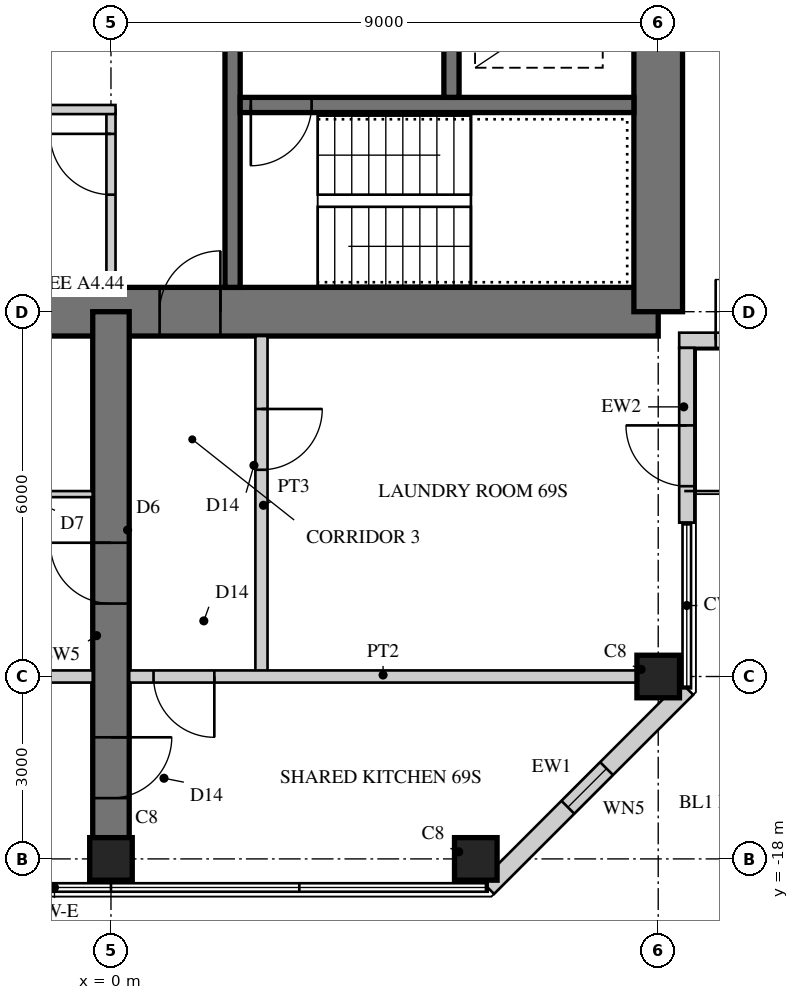
"""IFC4 building model, lengths in metres.
Left out: names, types, materials, properties, quantities, classifications, styles, units other than length and angle.
Written with IfcOpenShell. Run it as: python <this file> out.ifc"""

import sys

from ifc_helpers import new_model, si_unit, direction, frame, frame_2d, origin, origin_2d, place, context, subcontext, project, spatial, rectangle, hollow_rectangle, extrude, element, fill, save


model = new_model("IFC4")
c1 = context("Model", 3, precision=1e-05, world=origin(), true_north=direction((0.0, 1.0)))
c2 = subcontext(c1, "Body", "Model", "MODEL_VIEW")
j1 = project(units=[si_unit("LENGTHUNIT", "METRE"), si_unit("PLANEANGLEUNIT", "RADIAN")], contexts=[c1])
p1 = place(None, origin())
s1 = spatial("IfcSite", under=j1, at=p1, CompositionType="ELEMENT")
p2 = place(p1, origin())
s2 = spatial("IfcBuilding", under=s1, at=p2, CompositionType="ELEMENT")
p3 = place(p2, frame((0.0, 0.0, 267.9)))
s3 = spatial("IfcBuildingStorey", under=s2, at=p3, CompositionType="ELEMENT", Elevation=267.9)
p4 = place(p3, frame((-9.0, -9.0, 0.0), z_axis=(0.0, 0.0, 1.0), x_axis=(1.0, 0.0, 0.0)))
e1 = element("IfcWall", 1, at=p4, inside=s3, PredefinedType="SHEAR", context=c2, shape_type="SweptSolid", body=[
    extrude(rectangle(XDim=18.0, YDim=0.8, at=frame_2d((9.0, 0.0))), origin(), (0.0, 0.0, 1.0), 3.4),
])
p5 = place(p4, frame((9.8, 0.0, 0.0)))
e2 = element("IfcOpeningElement", 2, at=p5, cuts=e1, PredefinedType="OPENING", context=c2, shape_type="SweptSolid", body=[
    extrude(rectangle(XDim=1.0, YDim=2.4, at=frame_2d((0.5, 1.2))), frame((0.0, 0.41, 0.0), z_axis=(0.0, -1.0, 0.0), x_axis=(1.0, 0.0, 0.0)), (0.0, 0.0, 1.0), 0.82),
])
p6 = place(p3, frame((9.0, -9.0, 0.0), z_axis=(0.0, 0.0, 1.0), x_axis=(0.0, 1.0, 0.0)))
e3 = element("IfcWall", 3, at=p6, inside=s3, PredefinedType="SHEAR", context=c2, shape_type="SweptSolid", body=[
    extrude(rectangle(XDim=18.0, YDim=0.8, at=frame_2d((9.0, 0.0))), origin(), (0.0, 0.0, 1.0), 3.4),
])
p7 = place(p6, frame((9.8, 0.0, 0.0)))
e4 = element("IfcOpeningElement", 4, at=p7, cuts=e3, PredefinedType="OPENING", context=c2, shape_type="SweptSolid", body=[
    extrude(rectangle(XDim=1.0, YDim=2.4, at=frame_2d((0.5, 1.2))), frame((0.0, 0.41, 0.0), z_axis=(0.0, -1.0, 0.0), x_axis=(1.0, 0.0, 0.0)), (0.0, 0.0, 1.0), 0.82),
])
p8 = place(p3, frame((2.0, -1.675, 0.0), z_axis=(0.0, 0.0, 1.0), x_axis=(0.0, -1.0, 0.0)))
e5 = element("IfcWall", 5, at=p8, inside=s3, PredefinedType="SHEAR", context=c2, shape_type="SweptSolid", body=[
    extrude(rectangle(XDim=6.925, YDim=0.25, at=frame_2d((3.462, 0.0))), origin(), (0.0, 0.0, 1.0), 3.4),
])
p9 = place(p8, frame((0.725, 0.0, 0.0)))
e6 = element("IfcOpeningElement", 6, at=p9, cuts=e5, PredefinedType="OPENING", context=c2, shape_type="SweptSolid", body=[
    extrude(rectangle(XDim=1.0, YDim=2.1, at=frame_2d((0.5, 1.05))), frame((0.0, 0.135, 0.0), z_axis=(0.0, -1.0, 0.0), x_axis=(1.0, 0.0, 0.0)), (0.0, 0.0, 1.0), 0.27),
])
p10 = place(p3, frame((2.125, -5.6, 0.0), z_axis=(0.0, 0.0, 1.0), x_axis=(1.0, 0.0, 0.0)))
e7 = element("IfcWall", 7, at=p10, inside=s3, PredefinedType="SHEAR", context=c2, shape_type="SweptSolid", body=[
    extrude(rectangle(XDim=6.475, YDim=0.25, at=frame_2d((3.238, 0.0))), origin(), (0.0, 0.0, 1.0), 3.4),
])
p11 = place(p10, frame((0.175, 0.0, 0.0)))
e8 = element("IfcOpeningElement", 8, at=p11, cuts=e7, PredefinedType="OPENING", context=c2, shape_type="SweptSolid", body=[
    extrude(rectangle(XDim=1.0, YDim=2.1, at=frame_2d((0.5, 1.05))), frame((0.0, 0.135, 0.0), z_axis=(0.0, -1.0, 0.0), x_axis=(1.0, 0.0, 0.0)), (0.0, 0.0, 1.0), 0.27),
])
p12 = place(p3, frame((5.6, -1.925, 0.0), z_axis=(0.0, 0.0, 1.0), x_axis=(0.0, -1.0, 0.0)))
e9 = element("IfcWall", 9, at=p12, inside=s3, PredefinedType="SHEAR", context=c2, shape_type="SweptSolid", body=[
    extrude(rectangle(XDim=3.55, YDim=0.25, at=frame_2d((1.775, 0.0))), origin(), (0.0, 0.0, 1.0), 3.4),
])
p13 = place(p12, frame((1.525, 0.0, 0.0)))
e10 = element("IfcOpeningElement", 10, at=p13, cuts=e9, PredefinedType="OPENING", context=c2, shape_type="SweptSolid", body=[
    extrude(rectangle(XDim=1.1, YDim=2.2, at=frame_2d((0.55, 1.1))), frame((0.0, 0.135, 0.0), z_axis=(0.0, -1.0, 0.0), x_axis=(1.0, 0.0, 0.0)), (0.0, 0.0, 1.0), 0.27),
])
p14 = place(p12, frame((0.075, 0.0, 0.0)))
e11 = element("IfcOpeningElement", 11, at=p14, cuts=e9, PredefinedType="OPENING", context=c2, shape_type="SweptSolid", body=[
    extrude(rectangle(XDim=0.8, YDim=2.1, at=frame_2d((0.4, 1.05))), frame((0.0, 0.135, 0.0), z_axis=(0.0, -1.0, 0.0), x_axis=(1.0, 0.0, 0.0)), (0.0, 0.0, 1.0), 0.27),
])
p15 = place(p3, frame((0.0, -9.0, 0.0), z_axis=(0.0, 0.0, 1.0), x_axis=(0.0, -1.0, 0.0)))
e12 = element("IfcWall", 12, at=p15, inside=s3, PredefinedType="SHEAR", context=c2, shape_type="SweptSolid", body=[
    extrude(rectangle(XDim=9.0, YDim=0.6, at=frame_2d((4.5, 0.0))), origin(), (0.0, 0.0, 1.0), 3.4),
])
p16 = place(p15, frame((3.8, 0.0, 0.0)))
e13 = element("IfcOpeningElement", 13, at=p16, cuts=e12, PredefinedType="OPENING", context=c2, shape_type="SweptSolid", body=[
    extrude(rectangle(XDim=1.0, YDim=2.15, at=frame_2d((0.5, 1.075))), frame((0.0, 0.31, 0.0), z_axis=(0.0, -1.0, 0.0), x_axis=(1.0, 0.0, 0.0)), (0.0, 0.0, 1.0), 0.62),
])
p17 = place(p15, frame((7.0, 0.0, 0.0)))
e14 = element("IfcOpeningElement", 14, at=p17, cuts=e12, PredefinedType="OPENING", context=c2, shape_type="SweptSolid", body=[
    extrude(rectangle(XDim=1.0, YDim=2.2, at=frame_2d((0.5, 1.1))), frame((0.0, 0.31, 0.0), z_axis=(0.0, -1.0, 0.0), x_axis=(1.0, 0.0, 0.0)), (0.0, 0.0, 1.0), 0.62),
])
for number, where, z_axis, x_axis in (
    (15, (9.0, -15.0, 0.0), (0.0, 0.0, 1.0), (1.0, 0.0, 0.0)),
    (16, (0.0, -18.0, 0.0), (0.0, 0.0, 1.0), (1.0, 0.0, 0.0)),
    (17, (6.0, -18.0, 0.0), (0.0, 0.0, 1.0), (1.0, 0.0, 0.0)),
):
    element("IfcColumn", number, at=place(p3, frame(where, z_axis=z_axis, x_axis=x_axis)), inside=s3, PredefinedType="COLUMN", context=c2, shape_type="SweptSolid", body=[
        extrude(rectangle(XDim=0.7, YDim=0.7, at=origin_2d()), origin(), (0.0, 0.0, 1.0), 3.4),
    ])
p18 = place(p3, frame((9.345, -9.47, 0.0), z_axis=(0.0, 0.0, 1.0), x_axis=(1.0, 0.0, 0.0)))
e18 = element("IfcWall", 18, at=p18, inside=s3, PredefinedType="SOLIDWALL", context=c2, shape_type="SweptSolid", body=[
    extrude(rectangle(XDim=3.125, YDim=0.25, at=frame_2d((1.562, 0.0))), origin(), (0.0, 0.0, 1.0), 3.22),
])
p19 = place(p18, frame((0.6, 0.0, 0.0)))
e19 = element("IfcOpeningElement", 19, at=p19, cuts=e18, PredefinedType="OPENING", context=c2, shape_type="SweptSolid", body=[
    extrude(rectangle(XDim=1.0, YDim=2.2, at=frame_2d((0.5, 1.1))), frame((0.0, 0.135, 0.0), z_axis=(0.0, -1.0, 0.0), x_axis=(1.0, 0.0, 0.0)), (0.0, 0.0, 1.0), 0.27),
])
p20 = place(p3, frame((6.195, -18.47, 0.0), z_axis=(0.0, 0.0, 1.0), x_axis=(0.707106781187, 0.707106781187, 0.0)))
e20 = element("IfcWall", 20, at=p20, inside=s3, PredefinedType="SOLIDWALL", context=c2, shape_type="SweptSolid", body=[
    extrude(rectangle(XDim=4.632, YDim=0.3, at=frame_2d((2.316, 0.0))), origin(), (0.0, 0.0, 1.0), 3.22),
])
p21 = place(p20, frame((1.866, 0.0, 0.3)))
e21 = element("IfcOpeningElement", 21, at=p21, cuts=e20, PredefinedType="OPENING", context=c2, shape_type="SweptSolid", body=[
    extrude(rectangle(XDim=0.9, YDim=2.4, at=frame_2d((0.45, 1.2))), frame((0.0, 0.16, 0.0), z_axis=(0.0, -1.0, 0.0), x_axis=(1.0, 0.0, 0.0)), (0.0, 0.0, 1.0), 0.32),
])
p22 = place(p3, frame((9.47, -12.47, 0.0), z_axis=(0.0, 0.0, 1.0), x_axis=(0.0, 1.0, 0.0)))
e22 = element("IfcWall", 22, at=p22, inside=s3, PredefinedType="SOLIDWALL", context=c2, shape_type="SweptSolid", body=[
    extrude(rectangle(XDim=2.875, YDim=0.25, at=frame_2d((1.438, 0.0))), origin(), (0.0, 0.0, 1.0), 3.22),
])
p23 = place(p22, frame((0.6, 0.0, 0.0)))
e23 = element("IfcOpeningElement", 23, at=p23, cuts=e22, PredefinedType="OPENING", context=c2, shape_type="SweptSolid", body=[
    extrude(rectangle(XDim=1.0, YDim=2.2, at=frame_2d((0.5, 1.1))), frame((0.0, 0.135, 0.0), z_axis=(0.0, -1.0, 0.0), x_axis=(1.0, 0.0, 0.0)), (0.0, 0.0, 1.0), 0.27),
])
p24 = place(p3, frame((0.0, -5.675, 0.0), z_axis=(0.0, 0.0, 1.0), x_axis=(0.0, -1.0, 0.0)))
e24 = element("IfcWall", 24, at=p24, inside=s3, PredefinedType="PARTITIONING", context=c2, shape_type="SweptSolid", body=[
    extrude(rectangle(XDim=2.925, YDim=0.15, at=frame_2d((1.462, 0.0))), origin(), (0.0, 0.0, 1.0), 3.22),
])
p25 = place(p24, frame((0.4, 0.0, 0.0)))
e25 = element("IfcOpeningElement", 25, at=p25, cuts=e24, PredefinedType="OPENING", context=c2, shape_type="SweptSolid", body=[
    extrude(rectangle(XDim=1.0, YDim=2.1, at=frame_2d((0.5, 1.05))), frame((0.0, 0.085, 0.0), z_axis=(0.0, -1.0, 0.0), x_axis=(1.0, 0.0, 0.0)), (0.0, 0.0, 1.0), 0.17),
])
p26 = place(p3, frame((-1.675, -5.675, 0.0), z_axis=(0.0, 0.0, 1.0), x_axis=(1.0, 0.0, 0.0)))
e26 = element("IfcWall", 26, at=p26, inside=s3, PredefinedType="PARTITIONING", context=c2, shape_type="SweptSolid", body=[
    extrude(rectangle(XDim=1.75, YDim=0.15, at=frame_2d((0.875, 0.0))), origin(), (0.0, 0.0, 1.0), 3.22),
])
p27 = place(p3, frame((-2.5, -12.0, 0.0), z_axis=(0.0, 0.0, 1.0), x_axis=(1.0, 0.0, 0.0)))
e27 = element("IfcWall", 27, at=p27, inside=s3, PredefinedType="PARTITIONING", context=c2, shape_type="SweptSolid", body=[
    extrude(rectangle(XDim=2.2, YDim=0.1, at=frame_2d((1.1, 0.0))), origin(), (0.0, 0.0, 1.0), 3.22),
])
p28 = place(p27, frame((0.55, 0.0, 0.0)))
e28 = element("IfcOpeningElement", 28, at=p28, cuts=e27, PredefinedType="OPENING", context=c2, shape_type="SweptSolid", body=[
    extrude(rectangle(XDim=0.9, YDim=2.1, at=frame_2d((0.45, 1.05))), frame((0.0, 0.06, 0.0), z_axis=(0.0, -1.0, 0.0), x_axis=(1.0, 0.0, 0.0)), (0.0, 0.0, 1.0), 0.12),
])
p29 = place(p3, frame((2.475, -9.4, 0.0), z_axis=(0.0, 0.0, 1.0), x_axis=(0.0, -1.0, 0.0)))
e29 = element("IfcWall", 29, at=p29, inside=s3, PredefinedType="SOLIDWALL", context=c2, shape_type="SweptSolid", body=[
    extrude(rectangle(XDim=5.6, YDim=0.2, at=frame_2d((2.8, 0.0))), origin(), (0.0, 0.0, 1.0), 3.22),
])
p30 = place(p29, frame((1.2, 0.0, 0.0)))
e30 = element("IfcOpeningElement", 30, at=p30, cuts=e29, PredefinedType="OPENING", context=c2, shape_type="SweptSolid", body=[
    extrude(rectangle(XDim=1.0, YDim=2.2, at=frame_2d((0.5, 1.1))), frame((0.0, 0.11, 0.0), z_axis=(0.0, -1.0, 0.0), x_axis=(1.0, 0.0, 0.0)), (0.0, 0.0, 1.0), 0.22),
])
p31 = place(p3, frame((-8.65, -15.0, 0.0), z_axis=(0.0, 0.0, 1.0), x_axis=(1.0, 0.0, 0.0)))
e31 = element("IfcWall", 31, at=p31, inside=s3, PredefinedType="SOLIDWALL", context=c2, shape_type="SweptSolid", body=[
    extrude(rectangle(XDim=8.35, YDim=0.2, at=frame_2d((4.175, 0.0))), origin(), (0.0, 0.0, 1.0), 2.52),
])
p32 = place(p3, frame((0.3, -15.0, 0.0), z_axis=(0.0, 0.0, 1.0), x_axis=(1.0, 0.0, 0.0)))
e32 = element("IfcWall", 32, at=p32, inside=s3, PredefinedType="SOLIDWALL", context=c2, shape_type="SweptSolid", body=[
    extrude(rectangle(XDim=8.35, YDim=0.2, at=frame_2d((4.175, 0.0))), origin(), (0.0, 0.0, 1.0), 2.52),
])
p33 = place(p32, frame((0.4, 0.0, 0.0)))
e33 = element("IfcOpeningElement", 33, at=p33, cuts=e32, PredefinedType="OPENING", context=c2, shape_type="SweptSolid", body=[
    extrude(rectangle(XDim=1.0, YDim=2.2, at=frame_2d((0.5, 1.1))), frame((0.0, 0.11, 0.0), z_axis=(0.0, -1.0, 0.0), x_axis=(1.0, 0.0, 0.0)), (0.0, 0.0, 1.0), 0.22),
])
p34 = place(p19, origin())
e34 = element("IfcDoor", 34, at=p34, inside=s3, OperationType="SINGLE_SWING_LEFT", PredefinedType="DOOR", context=c2, shape_type="SweptSolid", body=[
    extrude(hollow_rectangle(XDim=1.0, YDim=2.2, WallThickness=0.06, at=frame_2d((0.5, 1.1))), frame((0.0, 0.025, 0.0), z_axis=(0.0, -1.0, 0.0), x_axis=(1.0, 0.0, 0.0)), (0.0, 0.0, 1.0), 0.05),
    extrude(rectangle(XDim=0.879, YDim=2.079, at=frame_2d((0.5, 1.1))), frame((0.0, 0.025, 0.0), z_axis=(0.0, -1.0, 0.0), x_axis=(1.0, 0.0, 0.0)), (0.0, 0.0, 1.0), 0.05),
])
fill(e19, e34)
p35 = place(p21, origin())
e35 = element("IfcWindow", 35, at=p35, inside=s3, PartitioningType="SINGLE_PANEL", PredefinedType="WINDOW", context=c2, shape_type="SweptSolid", body=[
    extrude(hollow_rectangle(XDim=0.9, YDim=2.4, WallThickness=0.06, at=frame_2d((0.45, 1.2))), frame((0.0, 0.03, 0.0), z_axis=(0.0, -1.0, 0.0), x_axis=(1.0, 0.0, 0.0)), (0.0, 0.0, 1.0), 0.06),
    extrude(rectangle(XDim=0.779, YDim=2.279, at=frame_2d((0.45, 1.2))), frame((0.0, 0.03, 0.0), z_axis=(0.0, -1.0, 0.0), x_axis=(1.0, 0.0, 0.0)), (0.0, 0.0, 1.0), 0.06),
])
fill(e21, e35)
p36 = place(p23, origin())
e36 = element("IfcDoor", 36, at=p36, inside=s3, OperationType="SINGLE_SWING_RIGHT", PredefinedType="DOOR", context=c2, shape_type="SweptSolid", body=[
    extrude(hollow_rectangle(XDim=1.0, YDim=2.2, WallThickness=0.06, at=frame_2d((0.5, 1.1))), frame((0.0, 0.025, 0.0), z_axis=(0.0, -1.0, 0.0), x_axis=(1.0, 0.0, 0.0)), (0.0, 0.0, 1.0), 0.05),
    extrude(rectangle(XDim=0.879, YDim=2.079, at=frame_2d((0.5, 1.1))), frame((0.0, 0.025, 0.0), z_axis=(0.0, -1.0, 0.0), x_axis=(1.0, 0.0, 0.0)), (0.0, 0.0, 1.0), 0.05),
])
fill(e23, e36)
p37 = place(p25, frame((1.0, 0.0, 0.0), z_axis=(0.0, 0.0, 1.0), x_axis=(-1.0, 0.0, 0.0)))
e37 = element("IfcDoor", 37, at=p37, inside=s3, OperationType="SINGLE_SWING_RIGHT", PredefinedType="DOOR", context=c2, shape_type="SweptSolid", body=[
    extrude(rectangle(XDim=1.0, YDim=2.1, at=frame_2d((0.5, 1.05))), frame((0.0, 0.025, 0.0), z_axis=(0.0, -1.0, 0.0), x_axis=(1.0, 0.0, 0.0)), (0.0, 0.0, 1.0), 0.05),
])
fill(e25, e37)
p38 = place(p30, origin())
e38 = element("IfcDoor", 38, at=p38, inside=s3, OperationType="SINGLE_SWING_LEFT", PredefinedType="DOOR", context=c2, shape_type="SweptSolid", body=[
    extrude(rectangle(XDim=1.0, YDim=2.2, at=frame_2d((0.5, 1.1))), frame((0.0, 0.025, 0.0), z_axis=(0.0, -1.0, 0.0), x_axis=(1.0, 0.0, 0.0)), (0.0, 0.0, 1.0), 0.05),
])
fill(e30, e38)
p39 = place(p33, frame((1.0, 0.0, 0.0), z_axis=(0.0, 0.0, 1.0), x_axis=(-1.0, 0.0, 0.0)))
e39 = element("IfcDoor", 39, at=p39, inside=s3, OperationType="SINGLE_SWING_LEFT", PredefinedType="DOOR", context=c2, shape_type="SweptSolid", body=[
    extrude(rectangle(XDim=1.0, YDim=2.2, at=frame_2d((0.5, 1.1))), frame((0.0, 0.025, 0.0), z_axis=(0.0, -1.0, 0.0), x_axis=(1.0, 0.0, 0.0)), (0.0, 0.0, 1.0), 0.05),
])
fill(e33, e39)
p40 = place(p16, frame((1.0, 0.0, 0.0), z_axis=(0.0, 0.0, 1.0), x_axis=(-1.0, 0.0, 0.0)))
e40 = element("IfcDoor", 40, at=p40, inside=s3, OperationType="SINGLE_SWING_RIGHT", PredefinedType="DOOR", context=c2, shape_type="SweptSolid", body=[
    extrude(rectangle(XDim=1.0, YDim=2.15, at=frame_2d((0.5, 1.075))), frame((0.0, 0.025, 0.0), z_axis=(0.0, -1.0, 0.0), x_axis=(1.0, 0.0, 0.0)), (0.0, 0.0, 1.0), 0.05),
])
fill(e13, e40)
p41 = place(p17, origin())
e41 = element("IfcDoor", 41, at=p41, inside=s3, OperationType="SINGLE_SWING_LEFT", PredefinedType="DOOR", context=c2, shape_type="SweptSolid", body=[
    extrude(rectangle(XDim=1.0, YDim=2.2, at=frame_2d((0.5, 1.1))), frame((0.0, 0.025, 0.0), z_axis=(0.0, -1.0, 0.0), x_axis=(1.0, 0.0, 0.0)), (0.0, 0.0, 1.0), 0.05),
])
fill(e14, e41)
p42 = place(p5, origin())
e42 = element("IfcDoor", 42, at=p42, inside=s3, OperationType="SINGLE_SWING_RIGHT", PredefinedType="DOOR", context=c2, shape_type="SweptSolid", body=[
    extrude(rectangle(XDim=1.0, YDim=2.4, at=frame_2d((0.5, 1.2))), frame((0.0, 0.055, 0.0), z_axis=(0.0, -1.0, 0.0), x_axis=(1.0, 0.0, 0.0)), (0.0, 0.0, 1.0), 0.05),
])
fill(e2, e42)
p43 = place(p11, frame((1.0, 0.0, 0.0), z_axis=(0.0, 0.0, 1.0), x_axis=(-1.0, 0.0, 0.0)))
e43 = element("IfcDoor", 43, at=p43, inside=s3, OperationType="SINGLE_SWING_RIGHT", PredefinedType="DOOR", context=c2, shape_type="SweptSolid", body=[
    extrude(rectangle(XDim=1.0, YDim=2.1, at=frame_2d((0.5, 1.05))), frame((0.0, 0.025, 0.0), z_axis=(0.0, -1.0, 0.0), x_axis=(1.0, 0.0, 0.0)), (0.0, 0.0, 1.0), 0.05),
])
fill(e8, e43)
save(model, sys.argv[1])
